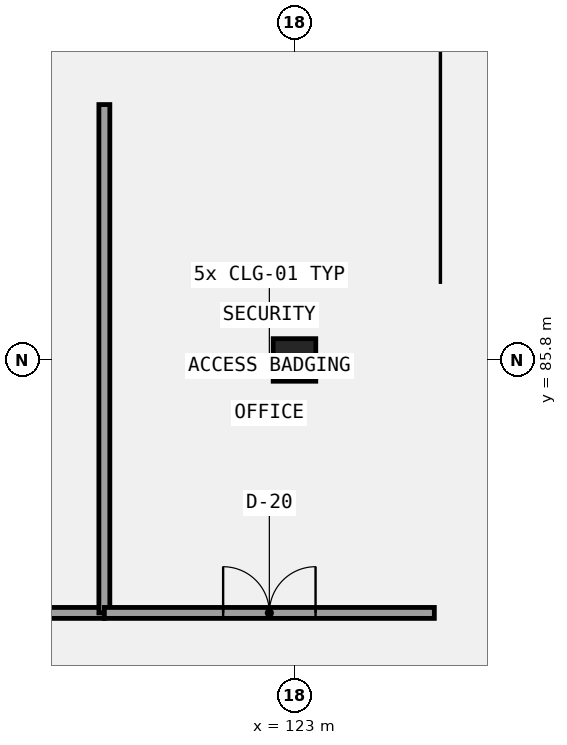
"""IFC4 building model, lengths in metres.
Left out: names, types, materials, properties, quantities, classifications, styles, units other than length and angle.
Written with IfcOpenShell. Run it as: python <this file> out.ifc"""

import sys

from ifc_helpers import new_model, si_unit, direction, frame, frame_2d, origin, origin_2d, place, context, subcontext, project, spatial, rectangle, extrude, element, fill, save


model = new_model("IFC4")
c1 = context("Model", 3, precision=1e-05, world=origin(), true_north=direction((0.0, 1.0)))
c2 = subcontext(c1, "Body", "Model", "MODEL_VIEW")
j1 = project(units=[si_unit("LENGTHUNIT", "METRE"), si_unit("PLANEANGLEUNIT", "RADIAN")], contexts=[c1])
p1 = place(None, origin())
s1 = spatial("IfcSite", under=j1, at=p1, CompositionType="ELEMENT")
p2 = place(p1, origin())
s2 = spatial("IfcBuilding", under=s1, at=p2, CompositionType="ELEMENT")
p3 = place(p2, origin())
s3 = spatial("IfcBuildingStorey", under=s2, at=p3, CompositionType="ELEMENT", Elevation=0.0)
p4 = place(p3, frame((123.0, 85.8, 0.0), z_axis=(0.0, 0.0, 1.0), x_axis=(1.0, 0.0, 0.0)))
e1 = element("IfcColumn", 1, at=p4, inside=s3, PredefinedType="COLUMN", context=c2, shape_type="SweptSolid", body=[
    extrude(rectangle(XDim=0.7, YDim=0.7, at=origin_2d()), origin(), (0.0, 0.0, 1.0), 5.4),
])
p5 = place(p3, frame((114.447, 81.64, 0.0), z_axis=(0.0, 0.0, 1.0), x_axis=(1.0, 0.0, 0.0)))
e2 = element("IfcWall", 2, at=p5, inside=s3, PredefinedType="PARTITIONING", context=c2, shape_type="SweptSolid", body=[
    extrude(rectangle(XDim=5.426, YDim=0.18, at=frame_2d((2.713, 0.0))), origin(), (0.0, 0.0, 1.0), 5.12),
])
p6 = place(p5, frame((1.953, 0.0, 0.0)))
e3 = element("IfcOpeningElement", 3, at=p6, cuts=e2, PredefinedType="OPENING", context=c2, shape_type="SweptSolid", body=[
    extrude(rectangle(XDim=1.52, YDim=2.1, at=frame_2d((0.76, 1.05))), frame((0.0, 0.1, 0.0), z_axis=(0.0, -1.0, 0.0), x_axis=(1.0, 0.0, 0.0)), (0.0, 0.0, 1.0), 0.2),
])
p7 = place(p3, frame((119.873, 81.64, 0.0), z_axis=(0.0, 0.0, 1.0), x_axis=(0.0, 1.0, 0.0)))
e4 = element("IfcWall", 4, at=p7, inside=s3, PredefinedType="PARTITIONING", context=c2, shape_type="SweptSolid", body=[
    extrude(rectangle(XDim=8.36, YDim=0.18, at=frame_2d((4.18, 0.0))), origin(), (0.0, 0.0, 1.0), 5.12),
])
p8 = place(p3, frame((119.873, 81.64, 0.0), z_axis=(0.0, 0.0, 1.0), x_axis=(1.0, 0.0, 0.0)))
e5 = element("IfcWall", 5, at=p8, inside=s3, PredefinedType="PARTITIONING", context=c2, shape_type="SweptSolid", body=[
    extrude(rectangle(XDim=5.427, YDim=0.18, at=frame_2d((2.713, 0.0))), origin(), (0.0, 0.0, 1.0), 5.12),
])
p9 = place(p8, frame((1.954, 0.0, 0.0)))
e6 = element("IfcOpeningElement", 6, at=p9, cuts=e5, PredefinedType="OPENING", context=c2, shape_type="SweptSolid", body=[
    extrude(rectangle(XDim=1.52, YDim=2.22, at=frame_2d((0.76, 1.11))), frame((0.0, 0.1, 0.0), z_axis=(0.0, -1.0, 0.0), x_axis=(1.0, 0.0, 0.0)), (0.0, 0.0, 1.0), 0.2),
])
p10 = place(p9, origin())
e7 = element("IfcDoor", 7, at=p10, inside=s3, OperationType="DOUBLE_DOOR_SINGLE_SWING", PredefinedType="DOOR", context=c2, shape_type="SweptSolid", body=[
    extrude(rectangle(XDim=1.52, YDim=2.22, at=frame_2d((0.76, 1.11))), frame((0.0, 0.025, 0.0), z_axis=(0.0, -1.0, 0.0), x_axis=(1.0, 0.0, 0.0)), (0.0, 0.0, 1.0), 0.05),
])
fill(e6, e7)
save(model, sys.argv[1])
